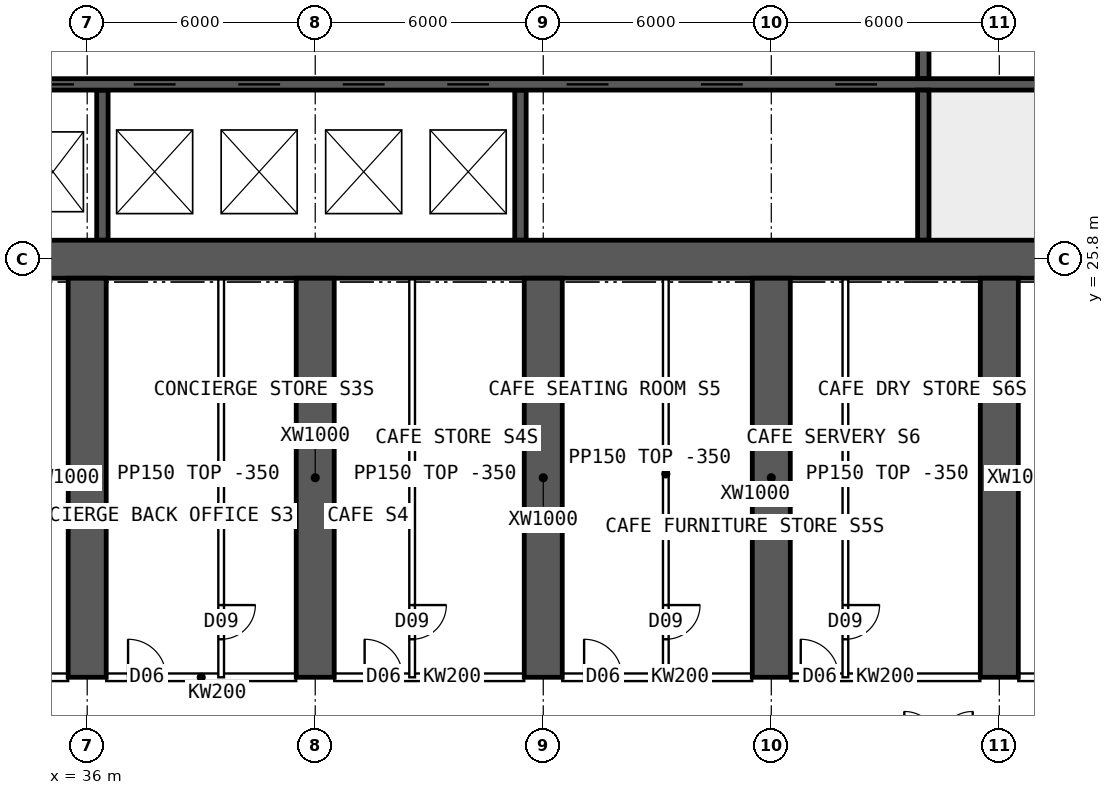
"""IFC4 building model, lengths in metres.
Left out: names, types, materials, properties, quantities, classifications, styles, units other than length and angle.
Written with IfcOpenShell. Run it as: python <this file> out.ifc"""

import sys

from ifc_helpers import new_model, si_unit, direction, frame, frame_2d, origin, place, context, subcontext, project, spatial, rectangle, extrude, element, fill, save


model = new_model("IFC4")
c1 = context("Model", 3, precision=1e-05, world=origin(), true_north=direction((0.0, 1.0)))
c2 = subcontext(c1, "Body", "Model", "MODEL_VIEW")
j1 = project(units=[si_unit("LENGTHUNIT", "METRE"), si_unit("PLANEANGLEUNIT", "RADIAN")], contexts=[c1])
p1 = place(None, origin())
s1 = spatial("IfcSite", under=j1, at=p1, CompositionType="ELEMENT")
p2 = place(p1, origin())
s2 = spatial("IfcBuilding", under=s1, at=p2, CompositionType="ELEMENT")
p3 = place(p2, origin())
s3 = spatial("IfcBuildingStorey", under=s2, at=p3, CompositionType="ELEMENT", Elevation=0.0)
p4 = place(p3, frame((18.0, 25.8, 0.0), z_axis=(0.0, 0.0, 1.0), x_axis=(1.0, 0.0, 0.0)))
e1 = element("IfcWall", 1, at=p4, inside=s3, PredefinedType="SHEAR", context=c2, shape_type="SweptSolid", body=[
    extrude(rectangle(XDim=48.0, YDim=1.0, at=frame_2d((24.0, 0.0))), origin(), (0.0, 0.0, 1.0), 6.0),
])
p5 = place(p3, frame((18.5, 30.4, 0.0), z_axis=(0.0, 0.0, 1.0), x_axis=(1.0, 0.0, 0.0)))
e2 = element("IfcWall", 2, at=p5, inside=s3, PredefinedType="SHEAR", context=c2, shape_type="SweptSolid", body=[
    extrude(rectangle(XDim=47.0, YDim=0.3, at=frame_2d((23.5, 0.0))), origin(), (0.0, 0.0, 1.0), 6.0),
])
p6 = place(p5, frame((0.4, 0.0, 0.0)))
e3 = element("IfcOpeningElement", 3, at=p6, cuts=e2, PredefinedType="OPENING", context=c2, shape_type="SweptSolid", body=[
    extrude(rectangle(XDim=1.0, YDim=2.1, at=frame_2d((0.5, 1.05))), frame((0.0, 0.16, 0.0), z_axis=(0.0, -1.0, 0.0), x_axis=(1.0, 0.0, 0.0)), (0.0, 0.0, 1.0), 0.32),
])
p7 = place(p5, frame((45.6, 0.0, 0.0)))
e4 = element("IfcOpeningElement", 4, at=p7, cuts=e2, PredefinedType="OPENING", context=c2, shape_type="SweptSolid", body=[
    extrude(rectangle(XDim=1.0, YDim=2.1, at=frame_2d((0.5, 1.05))), frame((0.0, 0.16, 0.0), z_axis=(0.0, -1.0, 0.0), x_axis=(1.0, 0.0, 0.0)), (0.0, 0.0, 1.0), 0.32),
])
p8 = place(p5, frame((8.25, 0.0, 0.0)))
e5 = element("IfcOpeningElement", 5, at=p8, cuts=e2, PredefinedType="OPENING", context=c2, shape_type="SweptSolid", body=[
    extrude(rectangle(XDim=1.1, YDim=2.1, at=frame_2d((0.55, 1.05))), frame((0.0, 0.16, 0.0), z_axis=(0.0, -1.0, 0.0), x_axis=(1.0, 0.0, 0.0)), (0.0, 0.0, 1.0), 0.32),
])
p9 = place(p5, frame((10.85, 0.0, 0.0)))
e6 = element("IfcOpeningElement", 6, at=p9, cuts=e2, PredefinedType="OPENING", context=c2, shape_type="SweptSolid", body=[
    extrude(rectangle(XDim=1.1, YDim=2.1, at=frame_2d((0.55, 1.05))), frame((0.0, 0.16, 0.0), z_axis=(0.0, -1.0, 0.0), x_axis=(1.0, 0.0, 0.0)), (0.0, 0.0, 1.0), 0.32),
])
p10 = place(p5, frame((13.45, 0.0, 0.0)))
e7 = element("IfcOpeningElement", 7, at=p10, cuts=e2, PredefinedType="OPENING", context=c2, shape_type="SweptSolid", body=[
    extrude(rectangle(XDim=1.1, YDim=2.1, at=frame_2d((0.55, 1.05))), frame((0.0, 0.16, 0.0), z_axis=(0.0, -1.0, 0.0), x_axis=(1.0, 0.0, 0.0)), (0.0, 0.0, 1.0), 0.32),
])
p11 = place(p5, frame((16.05, 0.0, 0.0)))
e8 = element("IfcOpeningElement", 8, at=p11, cuts=e2, PredefinedType="OPENING", context=c2, shape_type="SweptSolid", body=[
    extrude(rectangle(XDim=1.1, YDim=2.1, at=frame_2d((0.55, 1.05))), frame((0.0, 0.16, 0.0), z_axis=(0.0, -1.0, 0.0), x_axis=(1.0, 0.0, 0.0)), (0.0, 0.0, 1.0), 0.32),
])
p12 = place(p5, frame((18.725, 0.0, 0.0)))
e9 = element("IfcOpeningElement", 9, at=p12, cuts=e2, PredefinedType="OPENING", context=c2, shape_type="SweptSolid", body=[
    extrude(rectangle(XDim=1.1, YDim=2.1, at=frame_2d((0.55, 1.05))), frame((0.0, 0.16, 0.0), z_axis=(0.0, -1.0, 0.0), x_axis=(1.0, 0.0, 0.0)), (0.0, 0.0, 1.0), 0.32),
])
p13 = place(p5, frame((21.475, 0.0, 0.0)))
e10 = element("IfcOpeningElement", 10, at=p13, cuts=e2, PredefinedType="OPENING", context=c2, shape_type="SweptSolid", body=[
    extrude(rectangle(XDim=1.1, YDim=2.1, at=frame_2d((0.55, 1.05))), frame((0.0, 0.16, 0.0), z_axis=(0.0, -1.0, 0.0), x_axis=(1.0, 0.0, 0.0)), (0.0, 0.0, 1.0), 0.32),
])
p14 = place(p5, frame((24.225, 0.0, 0.0)))
e11 = element("IfcOpeningElement", 11, at=p14, cuts=e2, PredefinedType="OPENING", context=c2, shape_type="SweptSolid", body=[
    extrude(rectangle(XDim=1.1, YDim=2.1, at=frame_2d((0.55, 1.05))), frame((0.0, 0.16, 0.0), z_axis=(0.0, -1.0, 0.0), x_axis=(1.0, 0.0, 0.0)), (0.0, 0.0, 1.0), 0.32),
])
p15 = place(p5, frame((26.975, 0.0, 0.0)))
e12 = element("IfcOpeningElement", 12, at=p15, cuts=e2, PredefinedType="OPENING", context=c2, shape_type="SweptSolid", body=[
    extrude(rectangle(XDim=1.1, YDim=2.1, at=frame_2d((0.55, 1.05))), frame((0.0, 0.16, 0.0), z_axis=(0.0, -1.0, 0.0), x_axis=(1.0, 0.0, 0.0)), (0.0, 0.0, 1.0), 0.32),
])
p16 = place(p5, frame((30.117, 0.0, 0.0)))
e13 = element("IfcOpeningElement", 13, at=p16, cuts=e2, PredefinedType="OPENING", context=c2, shape_type="SweptSolid", body=[
    extrude(rectangle(XDim=1.1, YDim=2.1, at=frame_2d((0.55, 1.05))), frame((0.0, 0.16, 0.0), z_axis=(0.0, -1.0, 0.0), x_axis=(1.0, 0.0, 0.0)), (0.0, 0.0, 1.0), 0.32),
])
p17 = place(p5, frame((33.65, 0.0, 0.0)))
e14 = element("IfcOpeningElement", 14, at=p17, cuts=e2, PredefinedType="OPENING", context=c2, shape_type="SweptSolid", body=[
    extrude(rectangle(XDim=1.1, YDim=2.1, at=frame_2d((0.55, 1.05))), frame((0.0, 0.16, 0.0), z_axis=(0.0, -1.0, 0.0), x_axis=(1.0, 0.0, 0.0)), (0.0, 0.0, 1.0), 0.32),
])
p18 = place(p5, frame((37.183, 0.0, 0.0)))
e15 = element("IfcOpeningElement", 15, at=p18, cuts=e2, PredefinedType="OPENING", context=c2, shape_type="SweptSolid", body=[
    extrude(rectangle(XDim=1.1, YDim=2.1, at=frame_2d((0.55, 1.05))), frame((0.0, 0.16, 0.0), z_axis=(0.0, -1.0, 0.0), x_axis=(1.0, 0.0, 0.0)), (0.0, 0.0, 1.0), 0.32),
])
p19 = place(p3, frame((58.0, 26.3, 0.0), z_axis=(0.0, 0.0, 1.0), x_axis=(0.0, 1.0, 0.0)))
e16 = element("IfcWall", 16, at=p19, inside=s3, PredefinedType="SHEAR", context=c2, shape_type="SweptSolid", body=[
    extrude(rectangle(XDim=3.95, YDim=0.3, at=frame_2d((1.975, 0.0))), origin(), (0.0, 0.0, 1.0), 6.0),
])
p20 = place(p3, frame((58.0, 30.55, 0.0), z_axis=(0.0, 0.0, 1.0), x_axis=(0.0, 1.0, 0.0)))
e17 = element("IfcWall", 17, at=p20, inside=s3, PredefinedType="SHEAR", context=c2, shape_type="SweptSolid", body=[
    extrude(rectangle(XDim=3.9, YDim=0.3, at=frame_2d((1.95, 0.0))), origin(), (0.0, 0.0, 1.0), 6.0),
])
p21 = place(p20, frame((1.4, 0.0, 0.0)))
e18 = element("IfcOpeningElement", 18, at=p21, cuts=e17, PredefinedType="OPENING", context=c2, shape_type="SweptSolid", body=[
    extrude(rectangle(XDim=1.2, YDim=2.1, at=frame_2d((0.6, 1.05))), frame((0.0, 0.16, 0.0), z_axis=(0.0, -1.0, 0.0), x_axis=(1.0, 0.0, 0.0)), (0.0, 0.0, 1.0), 0.32),
])
for number, where, z_axis, x_axis in (
    (19, (36.4, 26.3, 0.0), (0.0, 0.0, 1.0), (0.0, 1.0, 0.0)),
    (20, (47.4, 26.3, 0.0), (0.0, 0.0, 1.0), (0.0, 1.0, 0.0)),
):
    element("IfcWall", number, at=place(p3, frame(where, z_axis=z_axis, x_axis=x_axis)), inside=s3, PredefinedType="SHEAR", context=c2, shape_type="SweptSolid", body=[
        extrude(rectangle(XDim=3.95, YDim=0.3, at=frame_2d((1.975, 0.0))), origin(), (0.0, 0.0, 1.0), 6.0),
    ])
for number, where, z_axis, x_axis in (
    (21, (36.0, 14.8, 0.0), (0.0, 0.0, 1.0), (0.0, 1.0, 0.0)),
    (22, (42.0, 14.8, 0.0), (0.0, 0.0, 1.0), (0.0, 1.0, 0.0)),
    (23, (48.0, 14.8, 0.0), (0.0, 0.0, 1.0), (0.0, 1.0, 0.0)),
    (24, (54.0, 14.8, 0.0), (0.0, 0.0, 1.0), (0.0, 1.0, 0.0)),
    (25, (60.0, 14.8, 0.0), (0.0, 0.0, 1.0), (0.0, 1.0, 0.0)),
):
    element("IfcWall", number, at=place(p3, frame(where, z_axis=z_axis, x_axis=x_axis)), inside=s3, PredefinedType="SHEAR", context=c2, shape_type="SweptSolid", body=[
        extrude(rectangle(XDim=10.5, YDim=1.0, at=frame_2d((5.25, 0.0))), origin(), (0.0, 0.0, 1.0), 6.0),
    ])
p22 = place(p3, frame((39.525, 14.8, 0.0), z_axis=(0.0, 0.0, 1.0), x_axis=(0.0, 1.0, 0.0)))
e26 = element("IfcWall", 26, at=p22, inside=s3, PredefinedType="PARTITIONING", context=c2, shape_type="SweptSolid", body=[
    extrude(rectangle(XDim=10.7, YDim=0.15, at=frame_2d((5.35, 0.0))), origin(), (0.0, 0.0, 1.0), 5.65),
])
p23 = place(p22, frame((1.0, 0.0, 0.0)))
e27 = element("IfcOpeningElement", 27, at=p23, cuts=e26, PredefinedType="OPENING", context=c2, shape_type="SweptSolid", body=[
    extrude(rectangle(XDim=0.9, YDim=2.1, at=frame_2d((0.45, 1.05))), frame((0.0, 0.085, 0.0), z_axis=(0.0, -1.0, 0.0), x_axis=(1.0, 0.0, 0.0)), (0.0, 0.0, 1.0), 0.17),
])
p24 = place(p3, frame((44.55, 14.8, 0.0), z_axis=(0.0, 0.0, 1.0), x_axis=(0.0, 1.0, 0.0)))
e28 = element("IfcWall", 28, at=p24, inside=s3, PredefinedType="PARTITIONING", context=c2, shape_type="SweptSolid", body=[
    extrude(rectangle(XDim=10.7, YDim=0.15, at=frame_2d((5.35, 0.0))), origin(), (0.0, 0.0, 1.0), 5.65),
])
p25 = place(p24, frame((1.0, 0.0, 0.0)))
e29 = element("IfcOpeningElement", 29, at=p25, cuts=e28, PredefinedType="OPENING", context=c2, shape_type="SweptSolid", body=[
    extrude(rectangle(XDim=0.9, YDim=2.1, at=frame_2d((0.45, 1.05))), frame((0.0, 0.085, 0.0), z_axis=(0.0, -1.0, 0.0), x_axis=(1.0, 0.0, 0.0)), (0.0, 0.0, 1.0), 0.17),
])
p26 = place(p3, frame((51.225, 14.8, 0.0), z_axis=(0.0, 0.0, 1.0), x_axis=(0.0, 1.0, 0.0)))
e30 = element("IfcWall", 30, at=p26, inside=s3, PredefinedType="PARTITIONING", context=c2, shape_type="SweptSolid", body=[
    extrude(rectangle(XDim=10.7, YDim=0.15, at=frame_2d((5.35, 0.0))), origin(), (0.0, 0.0, 1.0), 5.65),
])
p27 = place(p26, frame((1.0, 0.0, 0.0)))
e31 = element("IfcOpeningElement", 31, at=p27, cuts=e30, PredefinedType="OPENING", context=c2, shape_type="SweptSolid", body=[
    extrude(rectangle(XDim=0.9, YDim=2.1, at=frame_2d((0.45, 1.05))), frame((0.0, 0.085, 0.0), z_axis=(0.0, -1.0, 0.0), x_axis=(1.0, 0.0, 0.0)), (0.0, 0.0, 1.0), 0.17),
])
p28 = place(p3, frame((55.95, 14.8, 0.0), z_axis=(0.0, 0.0, 1.0), x_axis=(0.0, 1.0, 0.0)))
e32 = element("IfcWall", 32, at=p28, inside=s3, PredefinedType="PARTITIONING", context=c2, shape_type="SweptSolid", body=[
    extrude(rectangle(XDim=10.7, YDim=0.15, at=frame_2d((5.35, 0.0))), origin(), (0.0, 0.0, 1.0), 5.65),
])
p29 = place(p28, frame((1.0, 0.0, 0.0)))
e33 = element("IfcOpeningElement", 33, at=p29, cuts=e32, PredefinedType="OPENING", context=c2, shape_type="SweptSolid", body=[
    extrude(rectangle(XDim=0.9, YDim=2.1, at=frame_2d((0.45, 1.05))), frame((0.0, 0.085, 0.0), z_axis=(0.0, -1.0, 0.0), x_axis=(1.0, 0.0, 0.0)), (0.0, 0.0, 1.0), 0.17),
])
p30 = place(p3, frame((30.5, 14.8, 0.0), z_axis=(0.0, 0.0, 1.0), x_axis=(1.0, 0.0, 0.0)))
e34 = element("IfcWall", 34, at=p30, inside=s3, PredefinedType="SOLIDWALL", context=c2, shape_type="SweptSolid", body=[
    extrude(rectangle(XDim=5.0, YDim=0.2, at=frame_2d((2.5, 0.0))), origin(), (0.0, 0.0, 1.0), 5.65),
])
p31 = place(p30, frame((0.8, 0.0, 0.0)))
e35 = element("IfcOpeningElement", 35, at=p31, cuts=e34, PredefinedType="OPENING", context=c2, shape_type="SweptSolid", body=[
    extrude(rectangle(XDim=1.0, YDim=2.1, at=frame_2d((0.5, 1.05))), frame((0.0, 0.11, 0.0), z_axis=(0.0, -1.0, 0.0), x_axis=(1.0, 0.0, 0.0)), (0.0, 0.0, 1.0), 0.22),
])
p32 = place(p3, frame((36.5, 14.8, 0.0), z_axis=(0.0, 0.0, 1.0), x_axis=(1.0, 0.0, 0.0)))
e36 = element("IfcWall", 36, at=p32, inside=s3, PredefinedType="SOLIDWALL", context=c2, shape_type="SweptSolid", body=[
    extrude(rectangle(XDim=5.0, YDim=0.2, at=frame_2d((2.5, 0.0))), origin(), (0.0, 0.0, 1.0), 5.65),
])
p33 = place(p32, frame((0.575, 0.0, 0.0)))
e37 = element("IfcOpeningElement", 37, at=p33, cuts=e36, PredefinedType="OPENING", context=c2, shape_type="SweptSolid", body=[
    extrude(rectangle(XDim=1.0, YDim=2.1, at=frame_2d((0.5, 1.05))), frame((0.0, 0.11, 0.0), z_axis=(0.0, -1.0, 0.0), x_axis=(1.0, 0.0, 0.0)), (0.0, 0.0, 1.0), 0.22),
])
p34 = place(p3, frame((42.5, 14.8, 0.0), z_axis=(0.0, 0.0, 1.0), x_axis=(1.0, 0.0, 0.0)))
e38 = element("IfcWall", 38, at=p34, inside=s3, PredefinedType="SOLIDWALL", context=c2, shape_type="SweptSolid", body=[
    extrude(rectangle(XDim=5.0, YDim=0.2, at=frame_2d((2.5, 0.0))), origin(), (0.0, 0.0, 1.0), 5.65),
])
p35 = place(p34, frame((0.8, 0.0, 0.0)))
e39 = element("IfcOpeningElement", 39, at=p35, cuts=e38, PredefinedType="OPENING", context=c2, shape_type="SweptSolid", body=[
    extrude(rectangle(XDim=1.0, YDim=2.1, at=frame_2d((0.5, 1.05))), frame((0.0, 0.11, 0.0), z_axis=(0.0, -1.0, 0.0), x_axis=(1.0, 0.0, 0.0)), (0.0, 0.0, 1.0), 0.22),
])
p36 = place(p3, frame((48.5, 14.8, 0.0), z_axis=(0.0, 0.0, 1.0), x_axis=(1.0, 0.0, 0.0)))
e40 = element("IfcWall", 40, at=p36, inside=s3, PredefinedType="SOLIDWALL", context=c2, shape_type="SweptSolid", body=[
    extrude(rectangle(XDim=5.0, YDim=0.2, at=frame_2d((2.5, 0.0))), origin(), (0.0, 0.0, 1.0), 5.65),
])
p37 = place(p36, frame((0.575, 0.0, 0.0)))
e41 = element("IfcOpeningElement", 41, at=p37, cuts=e40, PredefinedType="OPENING", context=c2, shape_type="SweptSolid", body=[
    extrude(rectangle(XDim=1.0, YDim=2.1, at=frame_2d((0.5, 1.05))), frame((0.0, 0.11, 0.0), z_axis=(0.0, -1.0, 0.0), x_axis=(1.0, 0.0, 0.0)), (0.0, 0.0, 1.0), 0.22),
])
p38 = place(p3, frame((54.5, 14.8, 0.0), z_axis=(0.0, 0.0, 1.0), x_axis=(1.0, 0.0, 0.0)))
e42 = element("IfcWall", 42, at=p38, inside=s3, PredefinedType="SOLIDWALL", context=c2, shape_type="SweptSolid", body=[
    extrude(rectangle(XDim=5.0, YDim=0.2, at=frame_2d((2.5, 0.0))), origin(), (0.0, 0.0, 1.0), 5.65),
])
p39 = place(p38, frame((0.275, 0.0, 0.0)))
e43 = element("IfcOpeningElement", 43, at=p39, cuts=e42, PredefinedType="OPENING", context=c2, shape_type="SweptSolid", body=[
    extrude(rectangle(XDim=1.0, YDim=2.1, at=frame_2d((0.5, 1.05))), frame((0.0, 0.11, 0.0), z_axis=(0.0, -1.0, 0.0), x_axis=(1.0, 0.0, 0.0)), (0.0, 0.0, 1.0), 0.22),
])
p40 = place(p3, frame((60.5, 14.8, 0.0), z_axis=(0.0, 0.0, 1.0), x_axis=(1.0, 0.0, 0.0)))
e44 = element("IfcWall", 44, at=p40, inside=s3, PredefinedType="SOLIDWALL", context=c2, shape_type="SweptSolid", body=[
    extrude(rectangle(XDim=5.2, YDim=0.2, at=frame_2d((2.6, 0.0))), origin(), (0.0, 0.0, 1.0), 5.65),
])
p41 = place(p40, frame((0.575, 0.0, 0.0)))
e45 = element("IfcOpeningElement", 45, at=p41, cuts=e44, PredefinedType="OPENING", context=c2, shape_type="SweptSolid", body=[
    extrude(rectangle(XDim=1.0, YDim=2.1, at=frame_2d((0.5, 1.05))), frame((0.0, 0.11, 0.0), z_axis=(0.0, -1.0, 0.0), x_axis=(1.0, 0.0, 0.0)), (0.0, 0.0, 1.0), 0.22),
])
p42 = place(p11, origin())
e46 = element("IfcDoor", 46, at=p42, inside=s3, OperationType="DOUBLE_DOOR_SLIDING", PredefinedType="DOOR", context=c2, shape_type="SweptSolid", body=[
    extrude(rectangle(XDim=1.1, YDim=2.1, at=frame_2d((0.55, 1.05))), frame((0.0, 0.025, 0.0), z_axis=(0.0, -1.0, 0.0), x_axis=(1.0, 0.0, 0.0)), (0.0, 0.0, 1.0), 0.05),
])
fill(e8, e46)
p43 = place(p12, origin())
e47 = element("IfcDoor", 47, at=p43, inside=s3, OperationType="DOUBLE_DOOR_SLIDING", PredefinedType="DOOR", context=c2, shape_type="SweptSolid", body=[
    extrude(rectangle(XDim=1.1, YDim=2.1, at=frame_2d((0.55, 1.05))), frame((0.0, 0.025, 0.0), z_axis=(0.0, -1.0, 0.0), x_axis=(1.0, 0.0, 0.0)), (0.0, 0.0, 1.0), 0.05),
])
fill(e9, e47)
p44 = place(p13, origin())
e48 = element("IfcDoor", 48, at=p44, inside=s3, OperationType="DOUBLE_DOOR_SLIDING", PredefinedType="DOOR", context=c2, shape_type="SweptSolid", body=[
    extrude(rectangle(XDim=1.1, YDim=2.1, at=frame_2d((0.55, 1.05))), frame((0.0, 0.025, 0.0), z_axis=(0.0, -1.0, 0.0), x_axis=(1.0, 0.0, 0.0)), (0.0, 0.0, 1.0), 0.05),
])
fill(e10, e48)
p45 = place(p14, origin())
e49 = element("IfcDoor", 49, at=p45, inside=s3, OperationType="DOUBLE_DOOR_SLIDING", PredefinedType="DOOR", context=c2, shape_type="SweptSolid", body=[
    extrude(rectangle(XDim=1.1, YDim=2.1, at=frame_2d((0.55, 1.05))), frame((0.0, 0.025, 0.0), z_axis=(0.0, -1.0, 0.0), x_axis=(1.0, 0.0, 0.0)), (0.0, 0.0, 1.0), 0.05),
])
fill(e11, e49)
p46 = place(p15, origin())
e50 = element("IfcDoor", 50, at=p46, inside=s3, OperationType="DOUBLE_DOOR_SLIDING", PredefinedType="DOOR", context=c2, shape_type="SweptSolid", body=[
    extrude(rectangle(XDim=1.1, YDim=2.1, at=frame_2d((0.55, 1.05))), frame((0.0, 0.025, 0.0), z_axis=(0.0, -1.0, 0.0), x_axis=(1.0, 0.0, 0.0)), (0.0, 0.0, 1.0), 0.05),
])
fill(e12, e50)
p47 = place(p16, origin())
e51 = element("IfcDoor", 51, at=p47, inside=s3, OperationType="DOUBLE_DOOR_SLIDING", PredefinedType="DOOR", context=c2, shape_type="SweptSolid", body=[
    extrude(rectangle(XDim=1.1, YDim=2.1, at=frame_2d((0.55, 1.05))), frame((0.0, 0.025, 0.0), z_axis=(0.0, -1.0, 0.0), x_axis=(1.0, 0.0, 0.0)), (0.0, 0.0, 1.0), 0.05),
])
fill(e13, e51)
p48 = place(p17, origin())
e52 = element("IfcDoor", 52, at=p48, inside=s3, OperationType="DOUBLE_DOOR_SLIDING", PredefinedType="DOOR", context=c2, shape_type="SweptSolid", body=[
    extrude(rectangle(XDim=1.1, YDim=2.1, at=frame_2d((0.55, 1.05))), frame((0.0, 0.025, 0.0), z_axis=(0.0, -1.0, 0.0), x_axis=(1.0, 0.0, 0.0)), (0.0, 0.0, 1.0), 0.05),
])
fill(e14, e52)
p49 = place(p18, origin())
e53 = element("IfcDoor", 53, at=p49, inside=s3, OperationType="DOUBLE_DOOR_SLIDING", PredefinedType="DOOR", context=c2, shape_type="SweptSolid", body=[
    extrude(rectangle(XDim=1.1, YDim=2.1, at=frame_2d((0.55, 1.05))), frame((0.0, 0.025, 0.0), z_axis=(0.0, -1.0, 0.0), x_axis=(1.0, 0.0, 0.0)), (0.0, 0.0, 1.0), 0.05),
])
fill(e15, e53)
p50 = place(p23, origin())
e54 = element("IfcDoor", 54, at=p50, inside=s3, OperationType="SINGLE_SWING_RIGHT", PredefinedType="DOOR", context=c2, shape_type="SweptSolid", body=[
    extrude(rectangle(XDim=0.9, YDim=2.1, at=frame_2d((0.45, 1.05))), frame((0.0, 0.025, 0.0), z_axis=(0.0, -1.0, 0.0), x_axis=(1.0, 0.0, 0.0)), (0.0, 0.0, 1.0), 0.05),
])
fill(e27, e54)
p51 = place(p25, origin())
e55 = element("IfcDoor", 55, at=p51, inside=s3, OperationType="SINGLE_SWING_RIGHT", PredefinedType="DOOR", context=c2, shape_type="SweptSolid", body=[
    extrude(rectangle(XDim=0.9, YDim=2.1, at=frame_2d((0.45, 1.05))), frame((0.0, 0.025, 0.0), z_axis=(0.0, -1.0, 0.0), x_axis=(1.0, 0.0, 0.0)), (0.0, 0.0, 1.0), 0.05),
])
fill(e29, e55)
p52 = place(p27, origin())
e56 = element("IfcDoor", 56, at=p52, inside=s3, OperationType="SINGLE_SWING_RIGHT", PredefinedType="DOOR", context=c2, shape_type="SweptSolid", body=[
    extrude(rectangle(XDim=0.9, YDim=2.1, at=frame_2d((0.45, 1.05))), frame((0.0, 0.025, 0.0), z_axis=(0.0, -1.0, 0.0), x_axis=(1.0, 0.0, 0.0)), (0.0, 0.0, 1.0), 0.05),
])
fill(e31, e56)
p53 = place(p29, origin())
e57 = element("IfcDoor", 57, at=p53, inside=s3, OperationType="SINGLE_SWING_RIGHT", PredefinedType="DOOR", context=c2, shape_type="SweptSolid", body=[
    extrude(rectangle(XDim=0.9, YDim=2.1, at=frame_2d((0.45, 1.05))), frame((0.0, 0.025, 0.0), z_axis=(0.0, -1.0, 0.0), x_axis=(1.0, 0.0, 0.0)), (0.0, 0.0, 1.0), 0.05),
])
fill(e33, e57)
p54 = place(p33, origin())
e58 = element("IfcDoor", 58, at=p54, inside=s3, OperationType="SINGLE_SWING_LEFT", PredefinedType="DOOR", context=c2, shape_type="SweptSolid", body=[
    extrude(rectangle(XDim=1.0, YDim=2.1, at=frame_2d((0.5, 1.05))), frame((0.0, 0.025, 0.0), z_axis=(0.0, -1.0, 0.0), x_axis=(1.0, 0.0, 0.0)), (0.0, 0.0, 1.0), 0.05),
])
fill(e37, e58)
p55 = place(p35, origin())
e59 = element("IfcDoor", 59, at=p55, inside=s3, OperationType="SINGLE_SWING_LEFT", PredefinedType="DOOR", context=c2, shape_type="SweptSolid", body=[
    extrude(rectangle(XDim=1.0, YDim=2.1, at=frame_2d((0.5, 1.05))), frame((0.0, 0.025, 0.0), z_axis=(0.0, -1.0, 0.0), x_axis=(1.0, 0.0, 0.0)), (0.0, 0.0, 1.0), 0.05),
])
fill(e39, e59)
p56 = place(p37, origin())
e60 = element("IfcDoor", 60, at=p56, inside=s3, OperationType="SINGLE_SWING_LEFT", PredefinedType="DOOR", context=c2, shape_type="SweptSolid", body=[
    extrude(rectangle(XDim=1.0, YDim=2.1, at=frame_2d((0.5, 1.05))), frame((0.0, 0.025, 0.0), z_axis=(0.0, -1.0, 0.0), x_axis=(1.0, 0.0, 0.0)), (0.0, 0.0, 1.0), 0.05),
])
fill(e41, e60)
p57 = place(p39, origin())
e61 = element("IfcDoor", 61, at=p57, inside=s3, OperationType="SINGLE_SWING_LEFT", PredefinedType="DOOR", context=c2, shape_type="SweptSolid", body=[
    extrude(rectangle(XDim=1.0, YDim=2.1, at=frame_2d((0.5, 1.05))), frame((0.0, 0.025, 0.0), z_axis=(0.0, -1.0, 0.0), x_axis=(1.0, 0.0, 0.0)), (0.0, 0.0, 1.0), 0.05),
])
fill(e43, e61)
save(model, sys.argv[1])
